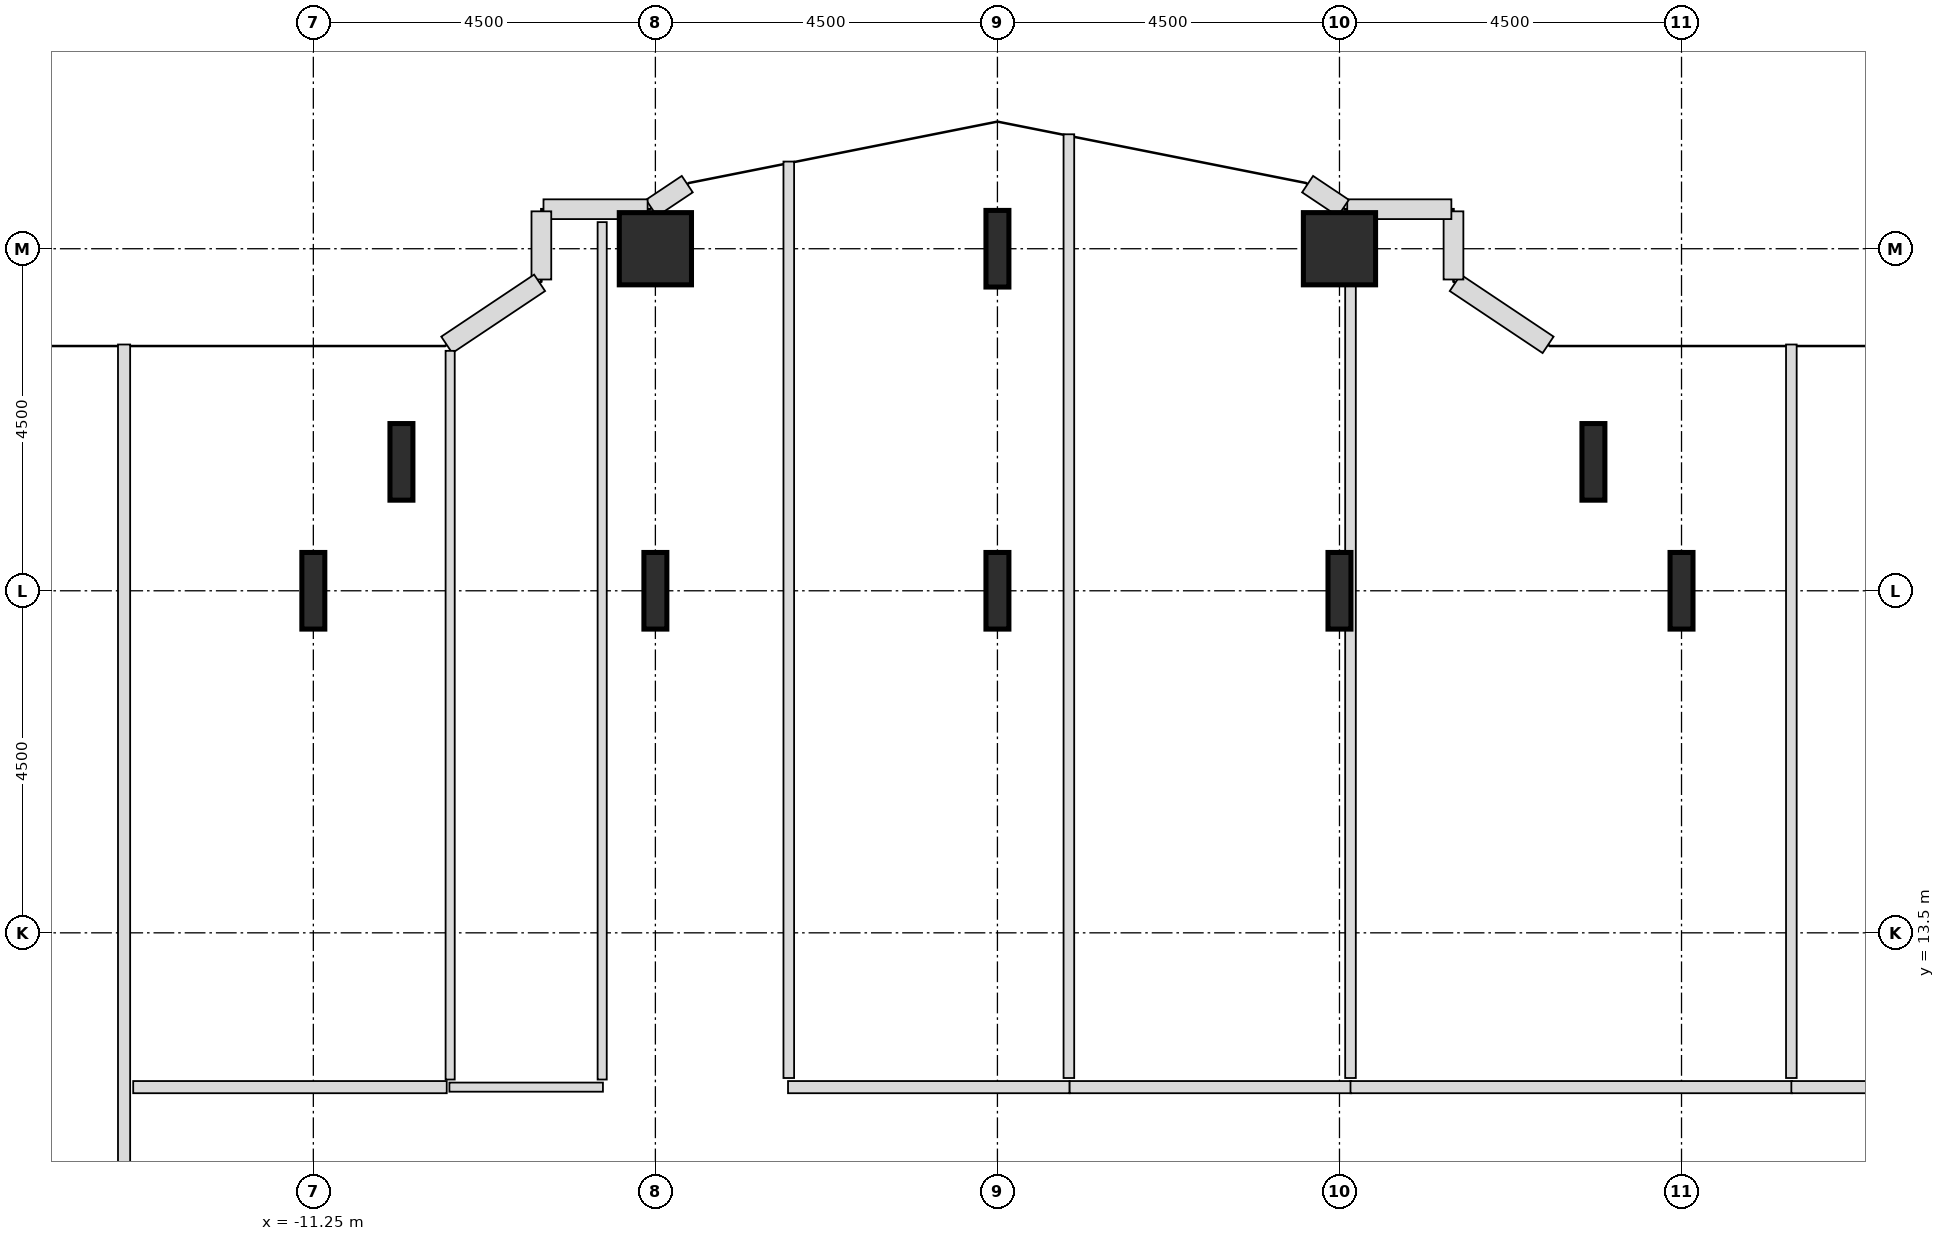
"""IFC4 building model, lengths in metres.
Left out: names, types, materials, properties, quantities, classifications, styles, units other than length and angle.
Written with IfcOpenShell. Run it as: python <this file> out.ifc"""

import sys

from ifc_helpers import new_model, si_unit, direction, frame, frame_2d, origin, origin_2d, place, context, subcontext, project, spatial, rectangle, hollow_rectangle, i_section, extrude, source, transform, mapped, element, fill, save


model = new_model("IFC4")
c1 = context("Model", 3, precision=1e-05, world=origin(), true_north=direction((0.0, 1.0)))
c2 = subcontext(c1, "Body", "Model", "MODEL_VIEW")
j1 = project(units=[si_unit("LENGTHUNIT", "METRE"), si_unit("PLANEANGLEUNIT", "RADIAN")], contexts=[c1])
p1 = place(None, origin())
s1 = spatial("IfcSite", under=j1, at=p1, CompositionType="ELEMENT")
p2 = place(p1, origin())
s2 = spatial("IfcBuilding", under=s1, at=p2, CompositionType="ELEMENT")
p3 = place(p2, frame((0.0, 0.0, 40.6)))
s3 = spatial("IfcBuildingStorey", under=s2, at=p3, CompositionType="ELEMENT", Elevation=40.6)
m1 = source(origin(), c2, "Body", "SweptSolid", [
    extrude(i_section(OverallWidth=0.302, OverallDepth=1.008, WebThickness=0.021, FlangeThickness=0.04, FilletRadius=0.03, at=origin_2d()), origin(), (0.0, 0.0, 1.0), 3.8),
])
for number, where, z_axis, x_axis in (
    (1, (-11.25, 18.0, 0.0), (0.0, 0.0, 1.0), (1.0, 0.0, 0.0)),
    (2, (-10.091, 19.696, 0.0), (0.0, 0.0, 1.0), (1.0, 0.0, 0.0)),
    (3, (-6.75, 18.0, 0.0), (0.0, 0.0, 1.0), (1.0, 0.0, 0.0)),
):
    element("IfcColumn", number, at=place(p3, frame(where, z_axis=z_axis, x_axis=x_axis)), inside=s3, PredefinedType="COLUMN", context=c2, shape_type="MappedRepresentation", body=[
        mapped(m1, transform((0.0, 0.0, 0.0), x_axis=(1.0, 0.0, 0.0), y_axis=(0.0, 1.0, 0.0), z_axis=(0.0, 0.0, 1.0), scale=1.0)),
    ])
m2 = source(origin(), c2, "Body", "SweptSolid", [
    extrude(hollow_rectangle(XDim=0.95, YDim=0.95, WallThickness=0.045, InnerFilletRadius=0.045, OuterFilletRadius=0.09, at=origin_2d()), origin(), (0.0, 0.0, 1.0), 3.8),
])
p4 = place(p3, frame((-6.75, 22.5, 0.0), z_axis=(0.0, 0.0, 1.0), x_axis=(1.0, 0.0, 0.0)))
e4 = element("IfcColumn", 4, at=p4, inside=s3, PredefinedType="COLUMN", context=c2, shape_type="MappedRepresentation", body=[
    mapped(m2, transform((0.0, 0.0, 0.0), x_axis=(1.0, 0.0, 0.0), y_axis=(0.0, 1.0, 0.0), z_axis=(0.0, 0.0, 1.0), scale=1.0)),
])
for number, where, z_axis, x_axis in (
    (5, (-2.25, 18.0, 0.0), (0.0, 0.0, 1.0), (1.0, 0.0, 0.0)),
    (6, (-2.25, 22.5, 0.0), (0.0, 0.0, 1.0), (1.0, 0.0, 0.0)),
    (7, (2.25, 18.0, 0.0), (0.0, 0.0, 1.0), (1.0, 0.0, 0.0)),
):
    element("IfcColumn", number, at=place(p3, frame(where, z_axis=z_axis, x_axis=x_axis)), inside=s3, PredefinedType="COLUMN", context=c2, shape_type="MappedRepresentation", body=[
        mapped(m1, transform((0.0, 0.0, 0.0), x_axis=(1.0, 0.0, 0.0), y_axis=(0.0, 1.0, 0.0), z_axis=(0.0, 0.0, 1.0), scale=1.0)),
    ])
p5 = place(p3, frame((2.25, 22.5, 0.0), z_axis=(0.0, 0.0, 1.0), x_axis=(1.0, 0.0, 0.0)))
e8 = element("IfcColumn", 8, at=p5, inside=s3, PredefinedType="COLUMN", context=c2, shape_type="MappedRepresentation", body=[
    mapped(m2, transform((0.0, 0.0, 0.0), x_axis=(1.0, 0.0, 0.0), y_axis=(0.0, 1.0, 0.0), z_axis=(0.0, 0.0, 1.0), scale=1.0)),
])
for number, where, z_axis, x_axis in (
    (9, (5.591, 19.696, 0.0), (0.0, 0.0, 1.0), (1.0, 0.0, 0.0)),
    (10, (6.75, 18.0, 0.0), (0.0, 0.0, 1.0), (1.0, 0.0, 0.0)),
):
    element("IfcColumn", number, at=place(p3, frame(where, z_axis=z_axis, x_axis=x_axis)), inside=s3, PredefinedType="COLUMN", context=c2, shape_type="MappedRepresentation", body=[
        mapped(m1, transform((0.0, 0.0, 0.0), x_axis=(1.0, 0.0, 0.0), y_axis=(0.0, 1.0, 0.0), z_axis=(0.0, 0.0, 1.0), scale=1.0)),
    ])
m3 = source(origin(), c2, "Body", "SweptSolid", [
    extrude(rectangle(XDim=1.469, YDim=0.26, at=frame_2d((0.734, 0.0))), origin(), (0.0, 0.0, 1.0), 3.55),
])
p6 = place(p3, frame((4.995, 21.236, 0.0), z_axis=(0.0, 0.0, 1.0), x_axis=(-0.831461760506, 0.555581983884, 0.0)))
e11 = element("IfcWall", 11, at=p6, inside=s3, PredefinedType="SOLIDWALL", context=c2, shape_type="MappedRepresentation", body=[
    mapped(m3, transform((0.0, 0.0, 0.0), x_axis=(1.0, 0.0, 0.0), y_axis=(0.0, 1.0, 0.0), z_axis=(0.0, 0.0, 1.0), scale=1.0)),
])
m4 = source(origin(), c2, "Body", "SweptSolid", [
    extrude(rectangle(XDim=0.897, YDim=0.26, at=frame_2d((0.448, 0.0))), origin(), (0.0, 0.0, 1.0), 3.55),
])
p7 = place(p3, frame((3.75, 22.095, 0.0), z_axis=(0.0, 0.0, 1.0), x_axis=(0.0, 1.0, 0.0)))
e12 = element("IfcWall", 12, at=p7, inside=s3, PredefinedType="SOLIDWALL", context=c2, shape_type="MappedRepresentation", body=[
    mapped(m4, transform((0.0, 0.0, 0.0), x_axis=(1.0, 0.0, 0.0), y_axis=(0.0, 1.0, 0.0), z_axis=(0.0, 0.0, 1.0), scale=1.0)),
])
m5 = source(origin(), c2, "Body", "SweptSolid", [
    extrude(rectangle(XDim=1.37, YDim=0.26, at=frame_2d((0.685, 0.0))), origin(), (0.0, 0.0, 1.0), 3.55),
])
p8 = place(p3, frame((3.722, 23.02, 0.0), z_axis=(0.0, 0.0, 1.0), x_axis=(-1.0, 0.0, 0.0)))
e13 = element("IfcWall", 13, at=p8, inside=s3, PredefinedType="SOLIDWALL", context=c2, shape_type="MappedRepresentation", body=[
    mapped(m5, transform((0.0, 0.0, 0.0), x_axis=(1.0, 0.0, 0.0), y_axis=(0.0, 1.0, 0.0), z_axis=(0.0, 0.0, 1.0), scale=1.0)),
])
m6 = source(origin(), c2, "Body", "SweptSolid", [
    extrude(rectangle(XDim=0.565, YDim=0.26, at=frame_2d((0.283, 0.0))), origin(), (0.0, 0.0, 1.0), 3.55),
])
for number, where, z_axis, x_axis in (
    (14, (2.301, 23.036, 0.0), (0.0, 0.0, 1.0), (-0.832, 0.555, 0.0)),
    (15, (-6.331, 23.35, 0.0), (0.0, 0.0, 1.0), (-0.832, -0.555, 0.0)),
):
    element("IfcWall", number, at=place(p3, frame(where, z_axis=z_axis, x_axis=x_axis)), inside=s3, PredefinedType="SOLIDWALL", context=c2, shape_type="MappedRepresentation", body=[
        mapped(m6, transform((0.0, 0.0, 0.0), x_axis=(1.0, 0.0, 0.0), y_axis=(0.0, 1.0, 0.0), z_axis=(0.0, 0.0, 1.0), scale=1.0)),
    ])
p9 = place(p3, frame((-6.852, 23.02, 0.0), z_axis=(0.0, 0.0, 1.0), x_axis=(-1.0, 0.0, 0.0)))
e16 = element("IfcWall", 16, at=p9, inside=s3, PredefinedType="SOLIDWALL", context=c2, shape_type="MappedRepresentation", body=[
    mapped(m5, transform((0.0, 0.0, 0.0), x_axis=(1.0, 0.0, 0.0), y_axis=(0.0, 1.0, 0.0), z_axis=(0.0, 0.0, 1.0), scale=1.0)),
])
p10 = place(p3, frame((-8.25, 22.992, 0.0), z_axis=(0.0, 0.0, 1.0), x_axis=(0.0, -1.0, 0.0)))
e17 = element("IfcWall", 17, at=p10, inside=s3, PredefinedType="SOLIDWALL", context=c2, shape_type="MappedRepresentation", body=[
    mapped(m4, transform((0.0, 0.0, 0.0), x_axis=(1.0, 0.0, 0.0), y_axis=(0.0, 1.0, 0.0), z_axis=(0.0, 0.0, 1.0), scale=1.0)),
])
p11 = place(p3, frame((-8.273, 22.052, 0.0), z_axis=(0.0, 0.0, 1.0), x_axis=(-0.831461760506, -0.555581983884, 0.0)))
e18 = element("IfcWall", 18, at=p11, inside=s3, PredefinedType="SOLIDWALL", context=c2, shape_type="MappedRepresentation", body=[
    mapped(m3, transform((0.0, 0.0, 0.0), x_axis=(1.0, 0.0, 0.0), y_axis=(0.0, 1.0, 0.0), z_axis=(0.0, 0.0, 1.0), scale=1.0)),
])
m7 = source(origin(), c2, "Body", "SweptSolid", [
    extrude(rectangle(XDim=2.02, YDim=0.12, at=frame_2d((1.01, 0.0))), origin(), (0.0, 0.0, 1.0), 3.535),
])
p12 = place(p3, frame((-9.46, 11.47, 0.0), z_axis=(0.0, 0.0, 1.0), x_axis=(1.0, 0.0, 0.0)))
e19 = element("IfcWall", 19, at=p12, inside=s3, PredefinedType="PLUMBINGWALL", context=c2, shape_type="MappedRepresentation", body=[
    mapped(m7, transform((0.0, 0.0, 0.0), x_axis=(1.0, 0.0, 0.0), y_axis=(0.0, 1.0, 0.0), z_axis=(0.0, 0.0, 1.0), scale=1.0)),
])
p13 = place(p12, frame((0.585, 0.0, 0.0)))
e20 = element("IfcOpeningElement", 20, at=p13, cuts=e19, PredefinedType="OPENING", context=c2, shape_type="SweptSolid", body=[
    extrude(rectangle(XDim=0.85, YDim=2.1, at=frame_2d((0.425, 1.05))), frame((0.0, 0.07, 0.0), z_axis=(0.0, -1.0, 0.0), x_axis=(1.0, 0.0, 0.0)), (0.0, 0.0, 1.0), 0.14),
])
m8 = source(origin(), c2, "Body", "SweptSolid", [
    extrude(rectangle(XDim=11.28, YDim=0.12, at=frame_2d((5.64, 0.0))), origin(), (0.0, 0.0, 1.0), 3.535),
])
p14 = place(p3, frame((-7.45, 11.57, 0.0), z_axis=(0.0, 0.0, 1.0), x_axis=(0.0, 1.0, 0.0)))
e21 = element("IfcWall", 21, at=p14, inside=s3, PredefinedType="PLUMBINGWALL", context=c2, shape_type="MappedRepresentation", body=[
    mapped(m8, transform((0.0, 0.0, 0.0), x_axis=(1.0, 0.0, 0.0), y_axis=(0.0, 1.0, 0.0), z_axis=(0.0, 0.0, 1.0), scale=1.0)),
])
m9 = source(origin(), c2, "Body", "SweptSolid", [
    extrude(rectangle(XDim=9.587, YDim=0.12, at=frame_2d((4.793, 0.0))), origin(), (0.0, 0.0, 1.0), 3.535),
])
p15 = place(p3, frame((-9.45, 11.57, 0.0), z_axis=(0.0, 0.0, 1.0), x_axis=(0.0, 1.0, 0.0)))
e22 = element("IfcWall", 22, at=p15, inside=s3, PredefinedType="PLUMBINGWALL", context=c2, shape_type="MappedRepresentation", body=[
    mapped(m9, transform((0.0, 0.0, 0.0), x_axis=(1.0, 0.0, 0.0), y_axis=(0.0, 1.0, 0.0), z_axis=(0.0, 0.0, 1.0), scale=1.0)),
])
m10 = source(origin(), c2, "Body", "SweptSolid", [
    extrude(rectangle(XDim=16.045, YDim=0.16, at=frame_2d((8.022, 0.0))), origin(), (0.0, 0.0, 1.0), 3.535),
])
p16 = place(p3, frame((-13.74, 5.195, 0.0), z_axis=(0.0, 0.0, 1.0), x_axis=(0.0, 1.0, 0.0)))
e23 = element("IfcWall", 23, at=p16, inside=s3, PredefinedType="PARTITIONING", context=c2, shape_type="MappedRepresentation", body=[
    mapped(m10, transform((0.0, 0.0, 0.0), x_axis=(1.0, 0.0, 0.0), y_axis=(0.0, 1.0, 0.0), z_axis=(0.0, 0.0, 1.0), scale=1.0)),
])
p17 = place(p16, frame((2.683, 0.0, 0.0)))
e24 = element("IfcOpeningElement", 24, at=p17, cuts=e23, PredefinedType="OPENING", context=c2, shape_type="SweptSolid", body=[
    extrude(rectangle(XDim=0.95, YDim=2.1, at=frame_2d((0.475, 1.05))), frame((0.0, 0.09, 0.0), z_axis=(0.0, -1.0, 0.0), x_axis=(1.0, 0.0, 0.0)), (0.0, 0.0, 1.0), 0.18),
])
m11 = source(origin(), c2, "Body", "SweptSolid", [
    extrude(rectangle(XDim=4.125, YDim=0.16, at=frame_2d((2.062, 0.0))), origin(), (0.0, 0.0, 1.0), 3.535),
])
p18 = place(p3, frame((-13.62, 11.47, 0.0), z_axis=(0.0, 0.0, 1.0), x_axis=(1.0, 0.0, 0.0)))
e25 = element("IfcWall", 25, at=p18, inside=s3, PredefinedType="PARTITIONING", context=c2, shape_type="MappedRepresentation", body=[
    mapped(m11, transform((0.0, 0.0, 0.0), x_axis=(1.0, 0.0, 0.0), y_axis=(0.0, 1.0, 0.0), z_axis=(0.0, 0.0, 1.0), scale=1.0)),
])
p19 = place(p18, frame((1.587, 0.0, 0.0)))
e26 = element("IfcOpeningElement", 26, at=p19, cuts=e25, PredefinedType="OPENING", context=c2, shape_type="SweptSolid", body=[
    extrude(rectangle(XDim=0.95, YDim=2.1, at=frame_2d((0.475, 1.05))), frame((0.0, 0.09, 0.0), z_axis=(0.0, -1.0, 0.0), x_axis=(1.0, 0.0, 0.0)), (0.0, 0.0, 1.0), 0.18),
])
m12 = source(origin(), c2, "Body", "SweptSolid", [
    extrude(rectangle(XDim=3.705, YDim=0.16, at=frame_2d((1.853, 0.0))), origin(), (0.0, 0.0, 1.0), 3.535),
])
p20 = place(p3, frame((-5.005, 11.47, 0.0), z_axis=(0.0, 0.0, 1.0), x_axis=(1.0, 0.0, 0.0)))
e27 = element("IfcWall", 27, at=p20, inside=s3, PredefinedType="PARTITIONING", context=c2, shape_type="MappedRepresentation", body=[
    mapped(m12, transform((0.0, 0.0, 0.0), x_axis=(1.0, 0.0, 0.0), y_axis=(0.0, 1.0, 0.0), z_axis=(0.0, 0.0, 1.0), scale=1.0)),
])
p21 = place(p20, frame((1.377, 0.0, 0.0)))
e28 = element("IfcOpeningElement", 28, at=p21, cuts=e27, PredefinedType="OPENING", context=c2, shape_type="SweptSolid", body=[
    extrude(rectangle(XDim=0.95, YDim=2.1, at=frame_2d((0.475, 1.05))), frame((0.0, 0.09, 0.0), z_axis=(0.0, -1.0, 0.0), x_axis=(1.0, 0.0, 0.0)), (0.0, 0.0, 1.0), 0.18),
])
m13 = source(origin(), c2, "Body", "SweptSolid", [
    extrude(rectangle(XDim=12.416, YDim=0.14, at=frame_2d((6.208, 0.0))), origin(), (0.0, 0.0, 1.0), 3.535),
])
p22 = place(p3, frame((-1.31, 11.59, 0.0), z_axis=(0.0, 0.0, 1.0), x_axis=(0.0, 1.0, 0.0)))
e29 = element("IfcWall", 29, at=p22, inside=s3, PredefinedType="PARTITIONING", context=c2, shape_type="MappedRepresentation", body=[
    mapped(m13, transform((0.0, 0.0, 0.0), x_axis=(1.0, 0.0, 0.0), y_axis=(0.0, 1.0, 0.0), z_axis=(0.0, 0.0, 1.0), scale=1.0)),
])
m14 = source(origin(), c2, "Body", "SweptSolid", [
    extrude(rectangle(XDim=12.057, YDim=0.14, at=frame_2d((6.028, 0.0))), origin(), (0.0, 0.0, 1.0), 3.535),
])
p23 = place(p3, frame((-4.995, 11.59, 0.0), z_axis=(0.0, 0.0, 1.0), x_axis=(0.0, 1.0, 0.0)))
e30 = element("IfcWall", 30, at=p23, inside=s3, PredefinedType="PARTITIONING", context=c2, shape_type="MappedRepresentation", body=[
    mapped(m14, transform((0.0, 0.0, 0.0), x_axis=(1.0, 0.0, 0.0), y_axis=(0.0, 1.0, 0.0), z_axis=(0.0, 0.0, 1.0), scale=1.0)),
])
m15 = source(origin(), c2, "Body", "SweptSolid", [
    extrude(rectangle(XDim=3.705, YDim=0.16, at=frame_2d((1.853, 0.0))), origin(), (0.0, 0.0, 1.0), 3.535),
])
p24 = place(p3, frame((-1.3, 11.47, 0.0), z_axis=(0.0, 0.0, 1.0), x_axis=(1.0, 0.0, 0.0)))
e31 = element("IfcWall", 31, at=p24, inside=s3, PredefinedType="PARTITIONING", context=c2, shape_type="MappedRepresentation", body=[
    mapped(m15, transform((0.0, 0.0, 0.0), x_axis=(1.0, 0.0, 0.0), y_axis=(0.0, 1.0, 0.0), z_axis=(0.0, 0.0, 1.0), scale=1.0)),
])
p25 = place(p24, frame((1.377, 0.0, 0.0)))
e32 = element("IfcOpeningElement", 32, at=p25, cuts=e31, PredefinedType="OPENING", context=c2, shape_type="SweptSolid", body=[
    extrude(rectangle(XDim=0.95, YDim=2.1, at=frame_2d((0.475, 1.05))), frame((0.0, 0.09, 0.0), z_axis=(0.0, -1.0, 0.0), x_axis=(1.0, 0.0, 0.0)), (0.0, 0.0, 1.0), 0.18),
])
m16 = source(origin(), c2, "Body", "SweptSolid", [
    extrude(rectangle(XDim=11.26, YDim=0.14, at=frame_2d((5.63, 0.0))), origin(), (0.0, 0.0, 1.0), 2.825),
])
p26 = place(p3, frame((2.395, 11.59, 0.0), z_axis=(0.0, 0.0, 1.0), x_axis=(0.0, 1.0, 0.0)))
e33 = element("IfcWall", 33, at=p26, inside=s3, PredefinedType="PARTITIONING", context=c2, shape_type="MappedRepresentation", body=[
    mapped(m16, transform((0.0, 0.0, 0.0), x_axis=(1.0, 0.0, 0.0), y_axis=(0.0, 1.0, 0.0), z_axis=(0.0, 0.0, 1.0), scale=1.0)),
])
m17 = source(origin(), c2, "Body", "SweptSolid", [
    extrude(rectangle(XDim=5.81, YDim=0.16, at=frame_2d((2.905, 0.0))), origin(), (0.0, 0.0, 1.0), 3.535),
])
p27 = place(p3, frame((2.395, 11.47, 0.0), z_axis=(0.0, 0.0, 1.0), x_axis=(1.0, 0.0, 0.0)))
e34 = element("IfcWall", 34, at=p27, inside=s3, PredefinedType="PARTITIONING", context=c2, shape_type="MappedRepresentation", body=[
    mapped(m17, transform((0.0, 0.0, 0.0), x_axis=(1.0, 0.0, 0.0), y_axis=(0.0, 1.0, 0.0), z_axis=(0.0, 0.0, 1.0), scale=1.0)),
])
p28 = place(p27, frame((2.43, 0.0, 0.0)))
e35 = element("IfcOpeningElement", 35, at=p28, cuts=e34, PredefinedType="OPENING", context=c2, shape_type="SweptSolid", body=[
    extrude(rectangle(XDim=0.95, YDim=2.1, at=frame_2d((0.475, 1.05))), frame((0.0, 0.09, 0.0), z_axis=(0.0, -1.0, 0.0), x_axis=(1.0, 0.0, 0.0)), (0.0, 0.0, 1.0), 0.18),
])
m18 = source(origin(), c2, "Body", "SweptSolid", [
    extrude(rectangle(XDim=9.65, YDim=0.14, at=frame_2d((4.825, 0.0))), origin(), (0.0, 0.0, 1.0), 3.535),
])
p29 = place(p3, frame((8.195, 11.59, 0.0), z_axis=(0.0, 0.0, 1.0), x_axis=(0.0, 1.0, 0.0)))
e36 = element("IfcWall", 36, at=p29, inside=s3, PredefinedType="PARTITIONING", context=c2, shape_type="MappedRepresentation", body=[
    mapped(m18, transform((0.0, 0.0, 0.0), x_axis=(1.0, 0.0, 0.0), y_axis=(0.0, 1.0, 0.0), z_axis=(0.0, 0.0, 1.0), scale=1.0)),
])
m19 = source(origin(), c2, "Body", "SweptSolid", [
    extrude(rectangle(XDim=5.425, YDim=0.16, at=frame_2d((2.712, 0.0))), origin(), (0.0, 0.0, 1.0), 3.535),
])
p30 = place(p3, frame((8.195, 11.47, 0.0), z_axis=(0.0, 0.0, 1.0), x_axis=(1.0, 0.0, 0.0)))
e37 = element("IfcWall", 37, at=p30, inside=s3, PredefinedType="PARTITIONING", context=c2, shape_type="MappedRepresentation", body=[
    mapped(m19, transform((0.0, 0.0, 0.0), x_axis=(1.0, 0.0, 0.0), y_axis=(0.0, 1.0, 0.0), z_axis=(0.0, 0.0, 1.0), scale=1.0)),
])
p31 = place(p30, frame((2.238, 0.0, 0.0)))
e38 = element("IfcOpeningElement", 38, at=p31, cuts=e37, PredefinedType="OPENING", context=c2, shape_type="SweptSolid", body=[
    extrude(rectangle(XDim=0.95, YDim=2.1, at=frame_2d((0.475, 1.05))), frame((0.0, 0.09, 0.0), z_axis=(0.0, -1.0, 0.0), x_axis=(1.0, 0.0, 0.0)), (0.0, 0.0, 1.0), 0.18),
])
m20 = source(origin(), c2, "Body", "SweptSolid", [
    extrude(rectangle(XDim=0.85, YDim=2.1, at=frame_2d((0.425, 1.05))), frame((0.0, 0.025, 0.0), z_axis=(0.0, -1.0, 0.0), x_axis=(1.0, 0.0, 0.0)), (0.0, 0.0, 1.0), 0.05),
])
p32 = place(p13, origin())
e39 = element("IfcDoor", 39, at=p32, inside=s3, OperationType="SINGLE_SWING_RIGHT", PredefinedType="DOOR", context=c2, shape_type="MappedRepresentation", body=[
    mapped(m20, transform((0.0, 0.0, 0.0), x_axis=(1.0, 0.0, 0.0), y_axis=(0.0, 1.0, 0.0), z_axis=(0.0, 0.0, 1.0), scale=1.0)),
])
fill(e20, e39)
m21 = source(origin(), c2, "Body", "SweptSolid", [
    extrude(rectangle(XDim=0.95, YDim=2.1, at=frame_2d((0.475, 1.05))), frame((0.0, 0.025, 0.0), z_axis=(0.0, -1.0, 0.0), x_axis=(1.0, 0.0, 0.0)), (0.0, 0.0, 1.0), 0.05),
])
p33 = place(p19, origin())
e40 = element("IfcDoor", 40, at=p33, inside=s3, OperationType="SINGLE_SWING_LEFT", PredefinedType="DOOR", context=c2, shape_type="MappedRepresentation", body=[
    mapped(m21, transform((0.0, 0.0, 0.0), x_axis=(1.0, 0.0, 0.0), y_axis=(0.0, 1.0, 0.0), z_axis=(0.0, 0.0, 1.0), scale=1.0)),
])
fill(e26, e40)
p34 = place(p21, origin())
e41 = element("IfcDoor", 41, at=p34, inside=s3, OperationType="SINGLE_SWING_RIGHT", PredefinedType="DOOR", context=c2, shape_type="MappedRepresentation", body=[
    mapped(m21, transform((0.0, 0.0, 0.0), x_axis=(1.0, 0.0, 0.0), y_axis=(0.0, 1.0, 0.0), z_axis=(0.0, 0.0, 1.0), scale=1.0)),
])
fill(e28, e41)
p35 = place(p25, origin())
e42 = element("IfcDoor", 42, at=p35, inside=s3, OperationType="SINGLE_SWING_LEFT", PredefinedType="DOOR", context=c2, shape_type="MappedRepresentation", body=[
    mapped(m21, transform((0.0, 0.0, 0.0), x_axis=(1.0, 0.0, 0.0), y_axis=(0.0, 1.0, 0.0), z_axis=(0.0, 0.0, 1.0), scale=1.0)),
])
fill(e32, e42)
p36 = place(p28, origin())
e43 = element("IfcDoor", 43, at=p36, inside=s3, OperationType="SINGLE_SWING_RIGHT", PredefinedType="DOOR", context=c2, shape_type="MappedRepresentation", body=[
    mapped(m21, transform((0.0, 0.0, 0.0), x_axis=(1.0, 0.0, 0.0), y_axis=(0.0, 1.0, 0.0), z_axis=(0.0, 0.0, 1.0), scale=1.0)),
])
fill(e35, e43)
save(model, sys.argv[1])
